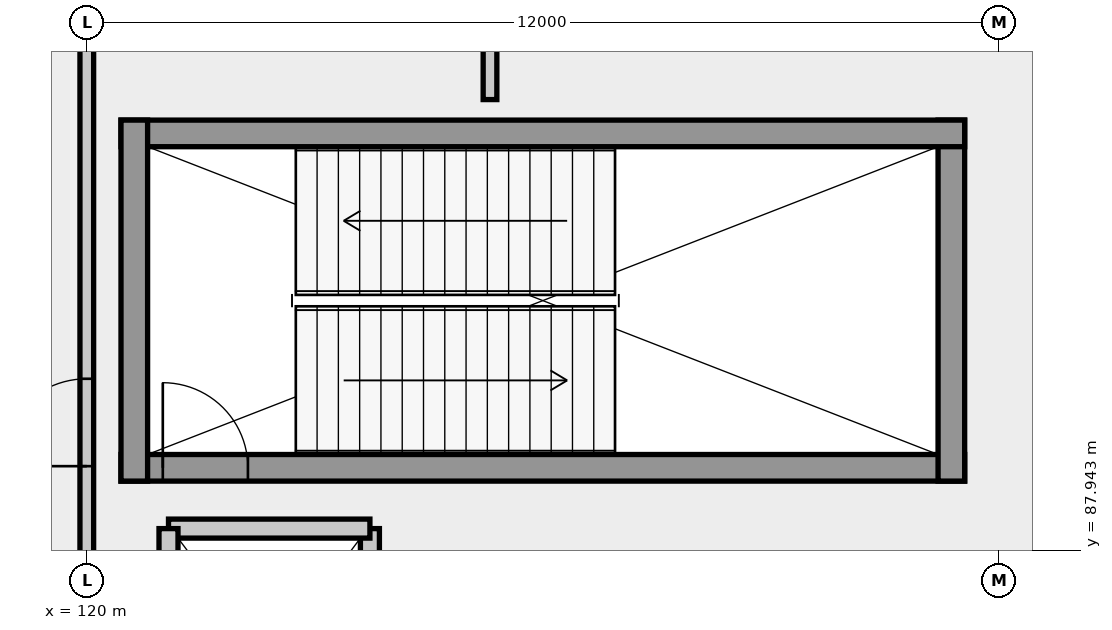
"""IFC4 building model, lengths in metres.
Left out: names, types, materials, properties, quantities, classifications, styles, units other than length and angle.
Written with IfcOpenShell. Run it as: python <this file> out.ifc"""

import sys

from ifc_helpers import new_model, si_unit, direction, frame, frame_2d, origin, place, context, subcontext, project, spatial, rectangle, extrude, element, fill, save


model = new_model("IFC4")
c1 = context("Model", 3, precision=1e-05, world=origin(), true_north=direction((0.0, 1.0)))
c2 = subcontext(c1, "Body", "Model", "MODEL_VIEW")
j1 = project(units=[si_unit("LENGTHUNIT", "METRE"), si_unit("PLANEANGLEUNIT", "RADIAN")], contexts=[c1])
p1 = place(None, origin())
s1 = spatial("IfcSite", under=j1, at=p1, CompositionType="ELEMENT")
p2 = place(p1, origin())
s2 = spatial("IfcBuilding", under=s1, at=p2, CompositionType="ELEMENT")
p3 = place(p2, frame((0.0, 0.0, 10.8)))
s3 = spatial("IfcBuildingStorey", under=s2, at=p3, CompositionType="ELEMENT", Elevation=10.8)
p4 = place(p3, frame((120.45, 89.025, 0.0), z_axis=(0.0, 0.0, 1.0), x_axis=(1.0, 0.0, 0.0)))
e1 = element("IfcWall", 1, at=p4, inside=s3, PredefinedType="SHEAR", context=c2, shape_type="SweptSolid", body=[
    extrude(rectangle(XDim=11.1, YDim=0.35, at=frame_2d((5.55, 0.0))), origin(), (0.0, 0.0, 1.0), 5.69),
])
p5 = place(p4, frame((0.55, 0.0, 0.0)))
e2 = element("IfcOpeningElement", 2, at=p5, cuts=e1, PredefinedType="OPENING", context=c2, shape_type="SweptSolid", body=[
    extrude(rectangle(XDim=1.12, YDim=2.2, at=frame_2d((0.56, 1.1))), frame((0.0, 0.185, 0.0), z_axis=(0.0, -1.0, 0.0), x_axis=(1.0, 0.0, 0.0)), (0.0, 0.0, 1.0), 0.37),
])
p6 = place(p3, frame((131.375, 88.85, 0.0), z_axis=(0.0, 0.0, 1.0), x_axis=(0.0, 1.0, 0.0)))
e3 = element("IfcWall", 3, at=p6, inside=s3, PredefinedType="SHEAR", context=c2, shape_type="SweptSolid", body=[
    extrude(rectangle(XDim=4.75, YDim=0.35, at=frame_2d((2.375, 0.0))), origin(), (0.0, 0.0, 1.0), 5.69),
])
p7 = place(p3, frame((131.55, 93.425, 0.0), z_axis=(0.0, 0.0, 1.0), x_axis=(-1.0, 0.0, 0.0)))
e4 = element("IfcWall", 4, at=p7, inside=s3, PredefinedType="SHEAR", context=c2, shape_type="SweptSolid", body=[
    extrude(rectangle(XDim=11.1, YDim=0.35, at=frame_2d((5.55, 0.0))), origin(), (0.0, 0.0, 1.0), 5.69),
])
p8 = place(p3, frame((120.625, 93.6, 0.0), z_axis=(0.0, 0.0, 1.0), x_axis=(0.0, -1.0, 0.0)))
e5 = element("IfcWall", 5, at=p8, inside=s3, PredefinedType="SHEAR", context=c2, shape_type="SweptSolid", body=[
    extrude(rectangle(XDim=4.75, YDim=0.35, at=frame_2d((2.375, 0.0))), origin(), (0.0, 0.0, 1.0), 5.69),
])
p9 = place(p3, frame((123.725, 84.775, 0.0), z_axis=(0.0, 0.0, 1.0), x_axis=(0.0, 1.0, 0.0)))
e6 = element("IfcWall", 6, at=p9, inside=s3, PredefinedType="SOLIDWALL", context=c2, shape_type="SweptSolid", body=[
    extrude(rectangle(XDim=3.45, YDim=0.25, at=frame_2d((1.725, 0.0))), origin(), (0.0, 0.0, 1.0), 5.69),
])
p10 = place(p9, frame((1.1, 0.0, 0.0)))
e7 = element("IfcOpeningElement", 7, at=p10, cuts=e6, PredefinedType="OPENING", context=c2, shape_type="SweptSolid", body=[
    extrude(rectangle(XDim=1.25, YDim=2.25, at=frame_2d((0.625, 1.125))), frame((0.0, 0.135, 0.0), z_axis=(0.0, -1.0, 0.0), x_axis=(1.0, 0.0, 0.0)), (0.0, 0.0, 1.0), 0.27),
])
p11 = place(p3, frame((123.725, 88.225, 0.0), z_axis=(0.0, 0.0, 1.0), x_axis=(-1.0, 0.0, 0.0)))
e8 = element("IfcWall", 8, at=p11, inside=s3, PredefinedType="SOLIDWALL", context=c2, shape_type="SweptSolid", body=[
    extrude(rectangle(XDim=2.65, YDim=0.25, at=frame_2d((1.325, 0.0))), origin(), (0.0, 0.0, 1.0), 5.69),
])
p12 = place(p3, frame((121.075, 88.225, 0.0), z_axis=(0.0, 0.0, 1.0), x_axis=(0.0, -1.0, 0.0)))
e9 = element("IfcWall", 9, at=p12, inside=s3, PredefinedType="SOLIDWALL", context=c2, shape_type="SweptSolid", body=[
    extrude(rectangle(XDim=3.45, YDim=0.25, at=frame_2d((1.725, 0.0))), origin(), (0.0, 0.0, 1.0), 5.69),
])
p13 = place(p3, frame((120.0, 84.594, 0.0), z_axis=(0.0, 0.0, 1.0), x_axis=(0.0, 1.0, 0.0)))
e10 = element("IfcWall", 10, at=p13, inside=s3, PredefinedType="PARTITIONING", context=c2, shape_type="SweptSolid", body=[
    extrude(rectangle(XDim=22.848, YDim=0.18, at=frame_2d((11.424, 0.0))), origin(), (0.0, 0.0, 1.0), 5.18),
])
p14 = place(p13, frame((4.452, 0.0, 0.0)))
e11 = element("IfcOpeningElement", 11, at=p14, cuts=e10, PredefinedType="OPENING", context=c2, shape_type="SweptSolid", body=[
    extrude(rectangle(XDim=1.15, YDim=2.25, at=frame_2d((0.575, 1.125))), frame((0.0, 0.1, 0.0), z_axis=(0.0, -1.0, 0.0), x_axis=(1.0, 0.0, 0.0)), (0.0, 0.0, 1.0), 0.2),
])
p15 = place(p3, frame((125.305, 93.87, 0.0), z_axis=(0.0, 0.0, 1.0), x_axis=(0.0, 1.0, 0.0)))
e12 = element("IfcWall", 12, at=p15, inside=s3, PredefinedType="PARTITIONING", context=c2, shape_type="SweptSolid", body=[
    extrude(rectangle(XDim=2.61, YDim=0.18, at=frame_2d((1.305, 0.0))), origin(), (0.0, 0.0, 1.0), 5.18),
])
p16 = place(p15, frame((0.65, 0.0, 0.0)))
e13 = element("IfcOpeningElement", 13, at=p16, cuts=e12, PredefinedType="OPENING", context=c2, shape_type="SweptSolid", body=[
    extrude(rectangle(XDim=0.92, YDim=2.15, at=frame_2d((0.46, 1.075))), frame((0.0, 0.1, 0.0), z_axis=(0.0, -1.0, 0.0), x_axis=(1.0, 0.0, 0.0)), (0.0, 0.0, 1.0), 0.2),
])
p17 = place(p5, origin())
e14 = element("IfcDoor", 14, at=p17, inside=s3, OperationType="SINGLE_SWING_LEFT", PredefinedType="DOOR", context=c2, shape_type="SweptSolid", body=[
    extrude(rectangle(XDim=1.12, YDim=2.2, at=frame_2d((0.56, 1.1))), frame((0.0, 0.025, 0.0), z_axis=(0.0, -1.0, 0.0), x_axis=(1.0, 0.0, 0.0)), (0.0, 0.0, 1.0), 0.05),
])
fill(e2, e14)
p18 = place(p14, origin())
e15 = element("IfcDoor", 15, at=p18, inside=s3, OperationType="SINGLE_SWING_LEFT", PredefinedType="DOOR", context=c2, shape_type="SweptSolid", body=[
    extrude(rectangle(XDim=1.15, YDim=2.25, at=frame_2d((0.575, 1.125))), frame((0.0, 0.025, 0.0), z_axis=(0.0, -1.0, 0.0), x_axis=(1.0, 0.0, 0.0)), (0.0, 0.0, 1.0), 0.05),
])
fill(e11, e15)
save(model, sys.argv[1])
